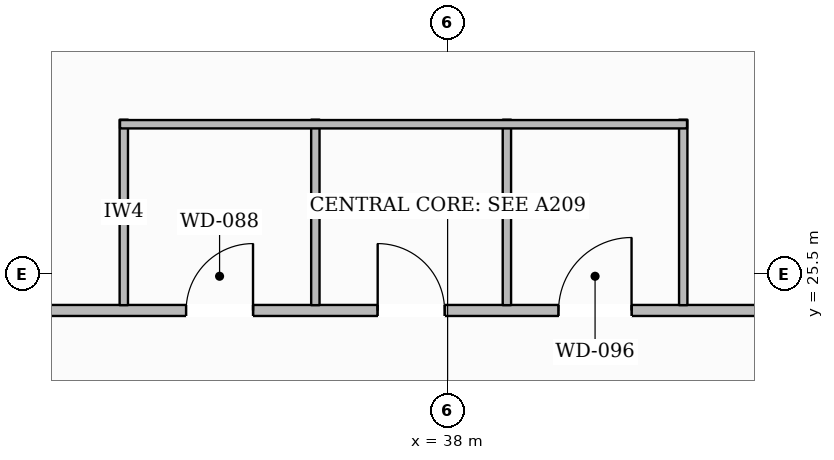
"""IFC4 building model, lengths in metres.
Left out: names, types, materials, properties, quantities, classifications, styles, units other than length and angle.
Written with IfcOpenShell. Run it as: python <this file> out.ifc"""

import sys

from ifc_helpers import new_model, si_unit, direction, frame, frame_2d, origin, place, context, subcontext, project, spatial, rectangle, extrude, element, fill, save


model = new_model("IFC4")
c1 = context("Model", 3, precision=1e-05, world=origin(), true_north=direction((0.0, 1.0)))
c2 = subcontext(c1, "Body", "Model", "MODEL_VIEW")
j1 = project(units=[si_unit("LENGTHUNIT", "METRE"), si_unit("PLANEANGLEUNIT", "RADIAN")], contexts=[c1])
p1 = place(None, origin())
s1 = spatial("IfcSite", under=j1, at=p1, CompositionType="ELEMENT")
p2 = place(p1, origin())
s2 = spatial("IfcBuilding", under=s1, at=p2, CompositionType="ELEMENT")
p3 = place(p2, frame((0.0, 0.0, 222.75)))
s3 = spatial("IfcBuildingStorey", under=s2, at=p3, CompositionType="ELEMENT", Elevation=222.75)
p4 = place(p3, frame((14.274, 10.826, 0.0), z_axis=(0.0, 0.0, 1.0), x_axis=(0.501112789677, 0.865381980412, 0.0)))
e1 = element("IfcWall", 1, at=p4, inside=s3, PredefinedType="STANDARD", context=c2, shape_type="SweptSolid", body=[
    extrude(rectangle(XDim=39.491, YDim=0.35, at=frame_2d((19.745, 0.0))), origin(), (0.0, 0.0, 1.0), 3.132),
])
p5 = place(p4, frame((29.018, 0.0, 0.0)))
e2 = element("IfcOpeningElement", 2, at=p5, cuts=e1, PredefinedType="OPENING", context=c2, shape_type="SweptSolid", body=[
    extrude(rectangle(XDim=1.0, YDim=2.2, at=frame_2d((0.5, 1.1))), frame((0.0, 0.185, 0.0), z_axis=(0.0, -1.0, 0.0), x_axis=(1.0, 0.0, 0.0)), (0.0, 0.0, 1.0), 0.37),
])
p6 = place(p4, frame((35.08, 0.0, 0.65)))
e3 = element("IfcOpeningElement", 3, at=p6, cuts=e1, PredefinedType="OPENING", context=c2, shape_type="SweptSolid", body=[
    extrude(rectangle(XDim=1.45, YDim=1.75, at=frame_2d((0.725, 0.875))), frame((0.0, 0.185, 0.0), z_axis=(0.0, -1.0, 0.0), x_axis=(1.0, 0.0, 0.0)), (0.0, 0.0, 1.0), 0.37),
])
p7 = place(p4, frame((22.233, 0.0, 0.65)))
e4 = element("IfcOpeningElement", 4, at=p7, cuts=e1, PredefinedType="OPENING", context=c2, shape_type="SweptSolid", body=[
    extrude(rectangle(XDim=1.45, YDim=1.75, at=frame_2d((0.725, 0.875))), frame((0.0, 0.185, 0.0), z_axis=(0.0, -1.0, 0.0), x_axis=(1.0, 0.0, 0.0)), (0.0, 0.0, 1.0), 0.37),
])
p8 = place(p4, frame((9.385, 0.0, 0.65)))
e5 = element("IfcOpeningElement", 5, at=p8, cuts=e1, PredefinedType="OPENING", context=c2, shape_type="SweptSolid", body=[
    extrude(rectangle(XDim=1.45, YDim=1.75, at=frame_2d((0.725, 0.875))), frame((0.0, 0.185, 0.0), z_axis=(0.0, -1.0, 0.0), x_axis=(1.0, 0.0, 0.0)), (0.0, 0.0, 1.0), 0.37),
])
p9 = place(p4, frame((2.962, 0.0, 0.65)))
e6 = element("IfcOpeningElement", 6, at=p9, cuts=e1, PredefinedType="OPENING", context=c2, shape_type="SweptSolid", body=[
    extrude(rectangle(XDim=1.45, YDim=1.75, at=frame_2d((0.725, 0.875))), frame((0.0, 0.185, 0.0), z_axis=(0.0, -1.0, 0.0), x_axis=(1.0, 0.0, 0.0)), (0.0, 0.0, 1.0), 0.37),
])
p10 = place(p3, frame((41.804, 45.08, 0.0), z_axis=(0.0, 0.0, 1.0), x_axis=(0.493108750239, -0.869967677812, 0.0)))
e7 = element("IfcWall", 7, at=p10, inside=s3, PredefinedType="STANDARD", context=c2, shape_type="SweptSolid", body=[
    extrude(rectangle(XDim=38.876, YDim=0.35, at=frame_2d((19.438, 0.0))), origin(), (0.0, 0.0, 1.0), 3.132),
])
p11 = place(p10, frame((28.557, 0.0, 0.0)))
e8 = element("IfcOpeningElement", 8, at=p11, cuts=e7, PredefinedType="OPENING", context=c2, shape_type="SweptSolid", body=[
    extrude(rectangle(XDim=1.0, YDim=2.2, at=frame_2d((0.5, 1.1))), frame((0.0, 0.185, 0.0), z_axis=(0.0, -1.0, 0.0), x_axis=(1.0, 0.0, 0.0)), (0.0, 0.0, 1.0), 0.37),
])
p12 = place(p10, frame((34.516, 0.0, 0.65)))
e9 = element("IfcOpeningElement", 9, at=p12, cuts=e7, PredefinedType="OPENING", context=c2, shape_type="SweptSolid", body=[
    extrude(rectangle(XDim=1.45, YDim=1.75, at=frame_2d((0.725, 0.875))), frame((0.0, 0.185, 0.0), z_axis=(0.0, -1.0, 0.0), x_axis=(1.0, 0.0, 0.0)), (0.0, 0.0, 1.0), 0.37),
])
p13 = place(p10, frame((21.876, 0.0, 0.65)))
e10 = element("IfcOpeningElement", 10, at=p13, cuts=e7, PredefinedType="OPENING", context=c2, shape_type="SweptSolid", body=[
    extrude(rectangle(XDim=1.45, YDim=1.75, at=frame_2d((0.725, 0.875))), frame((0.0, 0.185, 0.0), z_axis=(0.0, -1.0, 0.0), x_axis=(1.0, 0.0, 0.0)), (0.0, 0.0, 1.0), 0.37),
])
p14 = place(p10, frame((9.237, 0.0, 0.65)))
e11 = element("IfcOpeningElement", 11, at=p14, cuts=e7, PredefinedType="OPENING", context=c2, shape_type="SweptSolid", body=[
    extrude(rectangle(XDim=1.45, YDim=1.75, at=frame_2d((0.725, 0.875))), frame((0.0, 0.185, 0.0), z_axis=(0.0, -1.0, 0.0), x_axis=(1.0, 0.0, 0.0)), (0.0, 0.0, 1.0), 0.37),
])
p15 = place(p10, frame((2.917, 0.0, 0.65)))
e12 = element("IfcOpeningElement", 12, at=p15, cuts=e7, PredefinedType="OPENING", context=c2, shape_type="SweptSolid", body=[
    extrude(rectangle(XDim=1.45, YDim=1.75, at=frame_2d((0.725, 0.875))), frame((0.0, 0.185, 0.0), z_axis=(0.0, -1.0, 0.0), x_axis=(1.0, 0.0, 0.0)), (0.0, 0.0, 1.0), 0.37),
])
p16 = place(p3, frame((31.0, 25.02, 0.0), z_axis=(0.0, 0.0, 1.0), x_axis=(1.0, 0.0, 0.0)))
e13 = element("IfcWall", 13, at=p16, inside=s3, PredefinedType="PARTITIONING", context=c2, shape_type="SweptSolid", body=[
    extrude(rectangle(XDim=14.0, YDim=0.145, at=frame_2d((7.0, 0.0))), origin(), (0.0, 0.0, 1.0), 3.6),
])
p17 = place(p16, frame((3.56, 0.0, 0.0)))
e14 = element("IfcOpeningElement", 14, at=p17, cuts=e13, PredefinedType="OPENING", context=c2, shape_type="SweptSolid", body=[
    extrude(rectangle(XDim=0.88, YDim=2.1, at=frame_2d((0.44, 1.05))), frame((0.0, 0.083, 0.0), z_axis=(0.0, -1.0, 0.0), x_axis=(1.0, 0.0, 0.0)), (0.0, 0.0, 1.0), 0.165),
])
p18 = place(p16, frame((6.08, 0.0, 0.0)))
e15 = element("IfcOpeningElement", 15, at=p18, cuts=e13, PredefinedType="OPENING", context=c2, shape_type="SweptSolid", body=[
    extrude(rectangle(XDim=0.88, YDim=2.1, at=frame_2d((0.44, 1.05))), frame((0.0, 0.083, 0.0), z_axis=(0.0, -1.0, 0.0), x_axis=(1.0, 0.0, 0.0)), (0.0, 0.0, 1.0), 0.165),
])
p19 = place(p16, frame((8.46, 0.0, 0.0)))
e16 = element("IfcOpeningElement", 16, at=p19, cuts=e13, PredefinedType="OPENING", context=c2, shape_type="SweptSolid", body=[
    extrude(rectangle(XDim=0.96, YDim=2.1, at=frame_2d((0.48, 1.05))), frame((0.0, 0.083, 0.0), z_axis=(0.0, -1.0, 0.0), x_axis=(1.0, 0.0, 0.0)), (0.0, 0.0, 1.0), 0.165),
])
for number, where, z_axis, x_axis in (
    (17, (33.74, 25.09, 0.0), (0.0, 0.0, 1.0), (0.0, 1.0, 0.0)),
    (18, (36.26, 25.09, 0.0), (0.0, 0.0, 1.0), (0.0, 1.0, 0.0)),
    (19, (38.78, 25.09, 0.0), (0.0, 0.0, 1.0), (0.0, 1.0, 0.0)),
    (20, (41.1, 25.09, 0.0), (0.0, 0.0, 1.0), (0.0, 1.0, 0.0)),
):
    element("IfcWall", number, at=place(p3, frame(where, z_axis=z_axis, x_axis=x_axis)), inside=s3, PredefinedType="PLUMBINGWALL", context=c2, shape_type="SweptSolid", body=[
        extrude(rectangle(XDim=2.44, YDim=0.11, at=frame_2d((1.22, 0.0))), origin(), (0.0, 0.0, 1.0), 3.6),
    ])
p20 = place(p3, frame((33.69, 27.47, 0.0), z_axis=(0.0, 0.0, 1.0), x_axis=(1.0, 0.0, 0.0)))
e21 = element("IfcWall", 21, at=p20, inside=s3, PredefinedType="PLUMBINGWALL", context=c2, shape_type="SweptSolid", body=[
    extrude(rectangle(XDim=7.46, YDim=0.11, at=frame_2d((3.73, 0.0))), origin(), (0.0, 0.0, 1.0), 3.6),
])
p21 = place(p17, origin())
e22 = element("IfcDoor", 22, at=p21, inside=s3, OperationType="SINGLE_SWING_RIGHT", PredefinedType="DOOR", context=c2, shape_type="SweptSolid", body=[
    extrude(rectangle(XDim=0.88, YDim=2.1, at=frame_2d((0.44, 1.05))), frame((0.0, 0.025, 0.0), z_axis=(0.0, -1.0, 0.0), x_axis=(1.0, 0.0, 0.0)), (0.0, 0.0, 1.0), 0.05),
])
fill(e14, e22)
p22 = place(p18, origin())
e23 = element("IfcDoor", 23, at=p22, inside=s3, OperationType="SINGLE_SWING_LEFT", PredefinedType="DOOR", context=c2, shape_type="SweptSolid", body=[
    extrude(rectangle(XDim=0.88, YDim=2.1, at=frame_2d((0.44, 1.05))), frame((0.0, 0.025, 0.0), z_axis=(0.0, -1.0, 0.0), x_axis=(1.0, 0.0, 0.0)), (0.0, 0.0, 1.0), 0.05),
])
fill(e15, e23)
p23 = place(p19, origin())
e24 = element("IfcDoor", 24, at=p23, inside=s3, OperationType="SINGLE_SWING_RIGHT", PredefinedType="DOOR", context=c2, shape_type="SweptSolid", body=[
    extrude(rectangle(XDim=0.96, YDim=2.1, at=frame_2d((0.48, 1.05))), frame((0.0, 0.025, 0.0), z_axis=(0.0, -1.0, 0.0), x_axis=(1.0, 0.0, 0.0)), (0.0, 0.0, 1.0), 0.05),
])
fill(e16, e24)
save(model, sys.argv[1])
